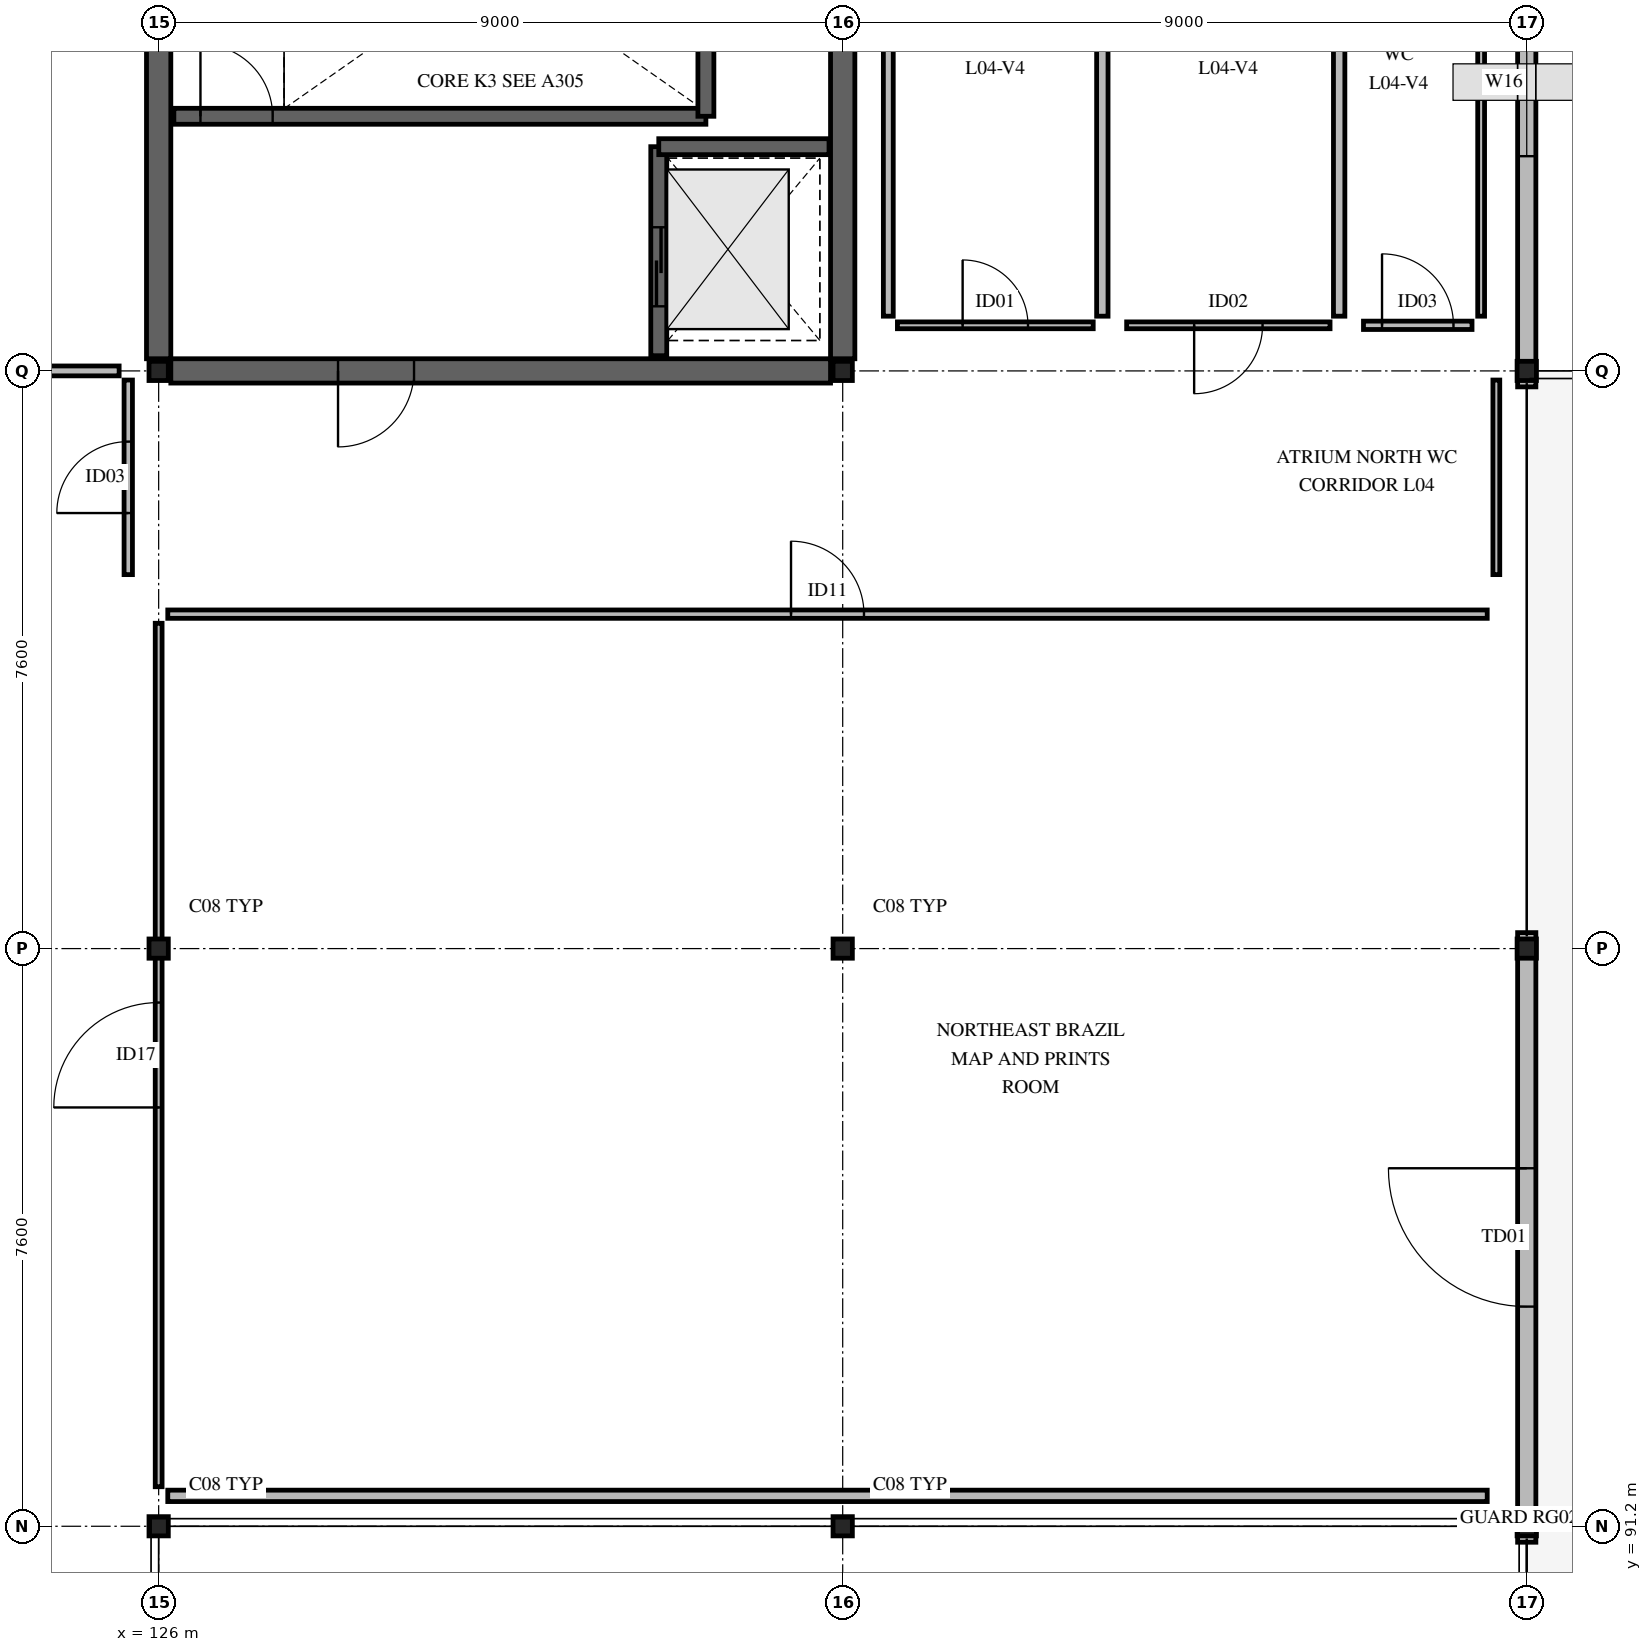
"""IFC4 building model, lengths in metres.
Left out: names, types, materials, properties, quantities, classifications, styles, units other than length and angle.
Written with IfcOpenShell. Run it as: python <this file> out.ifc"""

import sys

from ifc_helpers import new_model, si_unit, direction, frame, frame_2d, origin, origin_2d, place, context, subcontext, project, spatial, rectangle, i_section, extrude, element, fill, save


model = new_model("IFC4")
c1 = context("Model", 3, precision=1e-05, world=origin(), true_north=direction((0.0, 1.0)))
c2 = subcontext(c1, "Body", "Model", "MODEL_VIEW")
j1 = project(units=[si_unit("LENGTHUNIT", "METRE"), si_unit("PLANEANGLEUNIT", "RADIAN")], contexts=[c1])
p1 = place(None, origin())
s1 = spatial("IfcSite", under=j1, at=p1, CompositionType="ELEMENT")
p2 = place(p1, origin())
s2 = spatial("IfcBuilding", under=s1, at=p2, CompositionType="ELEMENT")
p3 = place(p2, frame((0.0, 0.0, 18.0)))
s3 = spatial("IfcBuildingStorey", under=s2, at=p3, CompositionType="ELEMENT", Elevation=18.0)
for number, where, z_axis, x_axis in (
    (1, (126.0, 91.2, 0.0), (0.0, 0.0, 1.0), (1.0, 0.0, 0.0)),
    (2, (126.0, 98.8, 0.0), (0.0, 0.0, 1.0), (1.0, 0.0, 0.0)),
    (3, (126.0, 106.4, 0.0), (0.0, 0.0, 1.0), (1.0, 0.0, 0.0)),
    (4, (135.0, 91.2, 0.0), (0.0, 0.0, 1.0), (1.0, 0.0, 0.0)),
    (5, (135.0, 98.8, 0.0), (0.0, 0.0, 1.0), (1.0, 0.0, 0.0)),
    (6, (135.0, 106.4, 0.0), (0.0, 0.0, 1.0), (1.0, 0.0, 0.0)),
    (7, (144.0, 91.2, 0.0), (0.0, 0.0, 1.0), (1.0, 0.0, 0.0)),
    (8, (144.0, 98.8, 0.0), (0.0, 0.0, 1.0), (1.0, 0.0, 0.0)),
    (9, (144.0, 106.4, 0.0), (0.0, 0.0, 1.0), (1.0, 0.0, 0.0)),
):
    element("IfcColumn", number, at=place(p3, frame(where, z_axis=z_axis, x_axis=x_axis)), inside=s3, PredefinedType="COLUMN", context=c2, shape_type="SweptSolid", body=[
        extrude(i_section(OverallWidth=0.254, OverallDepth=0.253, WebThickness=0.009, FlangeThickness=0.014, FilletRadius=0.012, at=origin_2d()), origin(), (0.0, 0.0, 1.0), 4.32),
    ])
p4 = place(p3, frame((144.0, 90.99, 0.0), z_axis=(0.0, 0.0, 1.0), x_axis=(0.0, 1.0, 0.0)))
e10 = element("IfcWall", 10, at=p4, inside=s3, PredefinedType="STANDARD", context=c2, shape_type="SweptSolid", body=[
    extrude(rectangle(XDim=8.02, YDim=0.24, at=frame_2d((4.01, 0.0))), origin(), (0.0, 0.0, 1.0), 3.768),
])
p5 = place(p4, frame((3.1, 0.0, 0.0)))
e11 = element("IfcOpeningElement", 11, at=p5, cuts=e10, PredefinedType="OPENING", context=c2, shape_type="SweptSolid", body=[
    extrude(rectangle(XDim=1.82, YDim=2.2, at=frame_2d((0.91, 1.1))), frame((0.0, 0.13, 0.0), z_axis=(0.0, -1.0, 0.0), x_axis=(1.0, 0.0, 0.0)), (0.0, 0.0, 1.0), 0.26),
])
p6 = place(p3, frame((144.0, 106.19, 0.0), z_axis=(0.0, 0.0, 1.0), x_axis=(0.0, 1.0, 0.0)))
e12 = element("IfcWall", 12, at=p6, inside=s3, PredefinedType="STANDARD", context=c2, shape_type="SweptSolid", body=[
    extrude(rectangle(XDim=7.81, YDim=0.24, at=frame_2d((3.905, 0.0))), origin(), (0.0, 0.0, 1.0), 3.768),
])
p7 = place(p6, frame((3.035, 0.0, 0.85)))
e13 = element("IfcOpeningElement", 13, at=p7, cuts=e12, PredefinedType="OPENING", context=c2, shape_type="SweptSolid", body=[
    extrude(rectangle(XDim=1.95, YDim=1.35, at=frame_2d((0.975, 0.675))), frame((0.0, 0.13, 0.0), z_axis=(0.0, -1.0, 0.0), x_axis=(1.0, 0.0, 0.0)), (0.0, 0.0, 1.0), 0.26),
])
p8 = place(p3, frame((126.16, 106.4, 0.0), z_axis=(0.0, 0.0, 1.0), x_axis=(1.0, 0.0, 0.0)))
e14 = element("IfcWall", 14, at=p8, inside=s3, PredefinedType="SHEAR", context=c2, shape_type="SweptSolid", body=[
    extrude(rectangle(XDim=8.68, YDim=0.32, at=frame_2d((4.34, 0.0))), origin(), (0.0, 0.0, 1.0), 4.04),
])
p9 = place(p8, frame((2.2, 0.0, 0.0)))
e15 = element("IfcOpeningElement", 15, at=p9, cuts=e14, PredefinedType="OPENING", context=c2, shape_type="SweptSolid", body=[
    extrude(rectangle(XDim=1.0, YDim=2.15, at=frame_2d((0.5, 1.075))), frame((0.0, 0.17, 0.0), z_axis=(0.0, -1.0, 0.0), x_axis=(1.0, 0.0, 0.0)), (0.0, 0.0, 1.0), 0.34),
])
for number, where, z_axis, x_axis in (
    (16, (126.0, 106.56, 0.0), (0.0, 0.0, 1.0), (0.0, 1.0, 0.0)),
    (17, (135.0, 106.56, 0.0), (0.0, 0.0, 1.0), (0.0, 1.0, 0.0)),
):
    element("IfcWall", number, at=place(p3, frame(where, z_axis=z_axis, x_axis=x_axis)), inside=s3, PredefinedType="SHEAR", context=c2, shape_type="SweptSolid", body=[
        extrude(rectangle(XDim=7.28, YDim=0.32, at=frame_2d((3.64, 0.0))), origin(), (0.0, 0.0, 1.0), 4.04),
    ])
p10 = place(p3, frame((126.2, 109.75, 0.0), z_axis=(0.0, 0.0, 1.0), x_axis=(1.0, 0.0, 0.0)))
e18 = element("IfcWall", 18, at=p10, inside=s3, PredefinedType="SOLIDWALL", context=c2, shape_type="SweptSolid", body=[
    extrude(rectangle(XDim=7.0, YDim=0.21, at=frame_2d((3.5, 0.0))), origin(), (0.0, 0.0, 1.0), 4.04),
])
p11 = place(p10, frame((0.35, 0.0, 0.0)))
e19 = element("IfcOpeningElement", 19, at=p11, cuts=e18, PredefinedType="OPENING", context=c2, shape_type="SweptSolid", body=[
    extrude(rectangle(XDim=0.95, YDim=2.12, at=frame_2d((0.475, 1.06))), frame((0.0, 0.115, 0.0), z_axis=(0.0, -1.0, 0.0), x_axis=(1.0, 0.0, 0.0)), (0.0, 0.0, 1.0), 0.23),
])
p12 = place(p3, frame((133.2, 109.75, 0.0), z_axis=(0.0, 0.0, 1.0), x_axis=(0.0, 1.0, 0.0)))
e20 = element("IfcWall", 20, at=p12, inside=s3, PredefinedType="SOLIDWALL", context=c2, shape_type="SweptSolid", body=[
    extrude(rectangle(XDim=4.05, YDim=0.21, at=frame_2d((2.025, 0.0))), origin(), (0.0, 0.0, 1.0), 4.04),
])
p13 = place(p3, frame((132.58, 106.6, 0.0), z_axis=(0.0, 0.0, 1.0), x_axis=(0.0, 1.0, 0.0)))
e21 = element("IfcWall", 21, at=p13, inside=s3, PredefinedType="SOLIDWALL", context=c2, shape_type="SweptSolid", body=[
    extrude(rectangle(XDim=2.75, YDim=0.21, at=frame_2d((1.375, 0.0))), origin(), (0.0, 0.0, 1.0), 4.04),
])
p14 = place(p13, frame((0.65, 0.0, 0.0)))
e22 = element("IfcOpeningElement", 22, at=p14, cuts=e21, PredefinedType="OPENING", context=c2, shape_type="SweptSolid", body=[
    extrude(rectangle(XDim=1.04, YDim=2.1, at=frame_2d((0.52, 1.05))), frame((0.0, 0.115, 0.0), z_axis=(0.0, -1.0, 0.0), x_axis=(1.0, 0.0, 0.0)), (0.0, 0.0, 1.0), 0.23),
])
p15 = place(p3, frame((132.58, 109.35, 0.0), z_axis=(0.0, 0.0, 1.0), x_axis=(1.0, 0.0, 0.0)))
e23 = element("IfcWall", 23, at=p15, inside=s3, PredefinedType="SOLIDWALL", context=c2, shape_type="SweptSolid", body=[
    extrude(rectangle(XDim=2.24, YDim=0.21, at=frame_2d((1.12, 0.0))), origin(), (0.0, 0.0, 1.0), 4.04),
])
p16 = place(p3, frame((126.12, 103.2, 0.0), z_axis=(0.0, 0.0, 1.0), x_axis=(1.0, 0.0, 0.0)))
e24 = element("IfcWall", 24, at=p16, inside=s3, PredefinedType="PARTITIONING", context=c2, shape_type="SweptSolid", body=[
    extrude(rectangle(XDim=17.36, YDim=0.11, at=frame_2d((8.68, 0.0))), origin(), (0.0, 0.0, 1.0), 4.04),
])
p17 = place(p16, frame((8.2, 0.0, 0.0)))
e25 = element("IfcOpeningElement", 25, at=p17, cuts=e24, PredefinedType="OPENING", context=c2, shape_type="SweptSolid", body=[
    extrude(rectangle(XDim=0.96, YDim=2.1, at=frame_2d((0.48, 1.05))), frame((0.0, 0.065, 0.0), z_axis=(0.0, -1.0, 0.0), x_axis=(1.0, 0.0, 0.0)), (0.0, 0.0, 1.0), 0.13),
])
p18 = place(p3, frame((126.0, 91.72, 0.0), z_axis=(0.0, 0.0, 1.0), x_axis=(0.0, 1.0, 0.0)))
e26 = element("IfcWall", 26, at=p18, inside=s3, PredefinedType="PARTITIONING", context=c2, shape_type="SweptSolid", body=[
    extrude(rectangle(XDim=11.36, YDim=0.09, at=frame_2d((5.68, 0.0))), origin(), (0.0, 0.0, 1.0), 3.611),
])
p19 = place(p18, frame((4.99, 0.0, 0.0)))
e27 = element("IfcOpeningElement", 27, at=p19, cuts=e26, PredefinedType="OPENING", context=c2, shape_type="SweptSolid", body=[
    extrude(rectangle(XDim=1.38, YDim=2.1, at=frame_2d((0.69, 1.05))), frame((0.0, 0.055, 0.0), z_axis=(0.0, -1.0, 0.0), x_axis=(1.0, 0.0, 0.0)), (0.0, 0.0, 1.0), 0.11),
])
p20 = place(p3, frame((126.12, 91.6, 0.0), z_axis=(0.0, 0.0, 1.0), x_axis=(1.0, 0.0, 0.0)))
e28 = element("IfcWall", 28, at=p20, inside=s3, PredefinedType="PARTITIONING", context=c2, shape_type="SweptSolid", body=[
    extrude(rectangle(XDim=17.36, YDim=0.15, at=frame_2d((8.68, 0.0))), origin(), (0.0, 0.0, 1.0), 4.04),
])
p21 = place(p3, frame((117.52, 106.4, 0.0), z_axis=(0.0, 0.0, 1.0), x_axis=(1.0, 0.0, 0.0)))
e29 = element("IfcWall", 29, at=p21, inside=s3, PredefinedType="PARTITIONING", context=c2, shape_type="SweptSolid", body=[
    extrude(rectangle(XDim=7.96, YDim=0.13, at=frame_2d((3.98, 0.0))), origin(), (0.0, 0.0, 1.0), 3.535),
])
p22 = place(p21, frame((3.47, 0.0, 0.0)))
e30 = element("IfcOpeningElement", 30, at=p22, cuts=e29, PredefinedType="OPENING", context=c2, shape_type="SweptSolid", body=[
    extrude(rectangle(XDim=1.02, YDim=2.1, at=frame_2d((0.51, 1.05))), frame((0.0, 0.075, 0.0), z_axis=(0.0, -1.0, 0.0), x_axis=(1.0, 0.0, 0.0)), (0.0, 0.0, 1.0), 0.15),
])
p23 = place(p3, frame((135.72, 107.0, 0.0), z_axis=(0.0, 0.0, 1.0), x_axis=(1.0, 0.0, 0.0)))
e31 = element("IfcWall", 31, at=p23, inside=s3, PredefinedType="PARTITIONING", context=c2, shape_type="SweptSolid", body=[
    extrude(rectangle(XDim=2.576, YDim=0.09, at=frame_2d((1.288, 0.0))), origin(), (0.0, 0.0, 1.0), 4.04),
])
p24 = place(p23, frame((0.858, 0.0, 0.0)))
e32 = element("IfcOpeningElement", 32, at=p24, cuts=e31, PredefinedType="OPENING", context=c2, shape_type="SweptSolid", body=[
    extrude(rectangle(XDim=0.86, YDim=2.06, at=frame_2d((0.43, 1.03))), frame((0.0, 0.055, 0.0), z_axis=(0.0, -1.0, 0.0), x_axis=(1.0, 0.0, 0.0)), (0.0, 0.0, 1.0), 0.11),
])
p25 = place(p3, frame((138.416, 107.12, 0.0), z_axis=(0.0, 0.0, 1.0), x_axis=(0.0, 1.0, 0.0)))
e33 = element("IfcWall", 33, at=p25, inside=s3, PredefinedType="PARTITIONING", context=c2, shape_type="SweptSolid", body=[
    extrude(rectangle(XDim=6.16, YDim=0.15, at=frame_2d((3.08, 0.0))), origin(), (0.0, 0.0, 1.0), 4.04),
])
p26 = place(p3, frame((135.6, 107.12, 0.0), z_axis=(0.0, 0.0, 1.0), x_axis=(0.0, 1.0, 0.0)))
e34 = element("IfcWall", 34, at=p26, inside=s3, PredefinedType="PARTITIONING", context=c2, shape_type="SweptSolid", body=[
    extrude(rectangle(XDim=6.16, YDim=0.13, at=frame_2d((3.08, 0.0))), origin(), (0.0, 0.0, 1.0), 4.04),
])
p27 = place(p3, frame((138.736, 107.0, 0.0), z_axis=(0.0, 0.0, 1.0), x_axis=(1.0, 0.0, 0.0)))
e35 = element("IfcWall", 35, at=p27, inside=s3, PredefinedType="PARTITIONING", context=c2, shape_type="SweptSolid", body=[
    extrude(rectangle(XDim=2.676, YDim=0.09, at=frame_2d((1.338, 0.0))), origin(), (0.0, 0.0, 1.0), 4.04),
])
p28 = place(p27, frame((0.888, 0.0, 0.0)))
e36 = element("IfcOpeningElement", 36, at=p28, cuts=e35, PredefinedType="OPENING", context=c2, shape_type="SweptSolid", body=[
    extrude(rectangle(XDim=0.9, YDim=2.06, at=frame_2d((0.45, 1.03))), frame((0.0, 0.055, 0.0), z_axis=(0.0, -1.0, 0.0), x_axis=(1.0, 0.0, 0.0)), (0.0, 0.0, 1.0), 0.11),
])
p29 = place(p3, frame((141.532, 107.12, 0.0), z_axis=(0.0, 0.0, 1.0), x_axis=(0.0, 1.0, 0.0)))
e37 = element("IfcWall", 37, at=p29, inside=s3, PredefinedType="PARTITIONING", context=c2, shape_type="SweptSolid", body=[
    extrude(rectangle(XDim=6.16, YDim=0.15, at=frame_2d((3.08, 0.0))), origin(), (0.0, 0.0, 1.0), 4.04),
])
p30 = place(p3, frame((141.852, 107.0, 0.0), z_axis=(0.0, 0.0, 1.0), x_axis=(1.0, 0.0, 0.0)))
e38 = element("IfcWall", 38, at=p30, inside=s3, PredefinedType="PARTITIONING", context=c2, shape_type="SweptSolid", body=[
    extrude(rectangle(XDim=1.428, YDim=0.11, at=frame_2d((0.714, 0.0))), origin(), (0.0, 0.0, 1.0), 4.04),
])
p31 = place(p30, frame((0.244, 0.0, 0.0)))
e39 = element("IfcOpeningElement", 39, at=p31, cuts=e38, PredefinedType="OPENING", context=c2, shape_type="SweptSolid", body=[
    extrude(rectangle(XDim=0.94, YDim=2.06, at=frame_2d((0.47, 1.03))), frame((0.0, 0.065, 0.0), z_axis=(0.0, -1.0, 0.0), x_axis=(1.0, 0.0, 0.0)), (0.0, 0.0, 1.0), 0.13),
])
p32 = place(p3, frame((143.4, 107.12, 0.0), z_axis=(0.0, 0.0, 1.0), x_axis=(0.0, 1.0, 0.0)))
e40 = element("IfcWall", 40, at=p32, inside=s3, PredefinedType="PARTITIONING", context=c2, shape_type="SweptSolid", body=[
    extrude(rectangle(XDim=6.16, YDim=0.09, at=frame_2d((3.08, 0.0))), origin(), (0.0, 0.0, 1.0), 4.04),
])
p33 = place(p3, frame((125.6, 103.72, 0.0), z_axis=(0.0, 0.0, 1.0), x_axis=(0.0, 1.0, 0.0)))
e41 = element("IfcWall", 41, at=p33, inside=s3, PredefinedType="PARTITIONING", context=c2, shape_type="SweptSolid", body=[
    extrude(rectangle(XDim=2.56, YDim=0.11, at=frame_2d((1.28, 0.0))), origin(), (0.0, 0.0, 1.0), 4.04),
])
p34 = place(p33, frame((0.81, 0.0, 0.0)))
e42 = element("IfcOpeningElement", 42, at=p34, cuts=e41, PredefinedType="OPENING", context=c2, shape_type="SweptSolid", body=[
    extrude(rectangle(XDim=0.94, YDim=2.06, at=frame_2d((0.47, 1.03))), frame((0.0, 0.065, 0.0), z_axis=(0.0, -1.0, 0.0), x_axis=(1.0, 0.0, 0.0)), (0.0, 0.0, 1.0), 0.13),
])
p35 = place(p3, frame((143.6, 103.72, 0.0), z_axis=(0.0, 0.0, 1.0), x_axis=(0.0, 1.0, 0.0)))
e43 = element("IfcWall", 43, at=p35, inside=s3, PredefinedType="PARTITIONING", context=c2, shape_type="SweptSolid", body=[
    extrude(rectangle(XDim=2.56, YDim=0.09, at=frame_2d((1.28, 0.0))), origin(), (0.0, 0.0, 1.0), 4.04),
])
p36 = place(p5, frame((1.82, 0.0, 0.0), z_axis=(0.0, 0.0, 1.0), x_axis=(-1.0, 0.0, 0.0)))
e44 = element("IfcDoor", 44, at=p36, inside=s3, OperationType="SINGLE_SWING_LEFT", PredefinedType="DOOR", context=c2, shape_type="SweptSolid", body=[
    extrude(rectangle(XDim=1.82, YDim=2.2, at=frame_2d((0.91, 1.1))), frame((0.0, 0.025, 0.0), z_axis=(0.0, -1.0, 0.0), x_axis=(1.0, 0.0, 0.0)), (0.0, 0.0, 1.0), 0.05),
])
fill(e11, e44)
p37 = place(p7, origin())
e45 = element("IfcWindow", 45, at=p37, inside=s3, PartitioningType="SINGLE_PANEL", PredefinedType="WINDOW", context=c2, shape_type="SweptSolid", body=[
    extrude(rectangle(XDim=1.95, YDim=1.35, at=frame_2d((0.975, 0.675))), frame((0.0, 0.03, 0.0), z_axis=(0.0, -1.0, 0.0), x_axis=(1.0, 0.0, 0.0)), (0.0, 0.0, 1.0), 0.06),
])
fill(e13, e45)
p38 = place(p11, origin())
e46 = element("IfcDoor", 46, at=p38, inside=s3, OperationType="SINGLE_SWING_LEFT", PredefinedType="DOOR", context=c2, shape_type="SweptSolid", body=[
    extrude(rectangle(XDim=0.95, YDim=2.12, at=frame_2d((0.475, 1.06))), frame((0.0, 0.025, 0.0), z_axis=(0.0, -1.0, 0.0), x_axis=(1.0, 0.0, 0.0)), (0.0, 0.0, 1.0), 0.05),
])
fill(e19, e46)
p39 = place(p14, origin())
e47 = element("IfcDoor", 47, at=p39, inside=s3, OperationType="SLIDING_TO_LEFT", PredefinedType="DOOR", context=c2, shape_type="SweptSolid", body=[
    extrude(rectangle(XDim=1.04, YDim=2.1, at=frame_2d((0.52, 1.05))), frame((0.0, 0.025, 0.0), z_axis=(0.0, -1.0, 0.0), x_axis=(1.0, 0.0, 0.0)), (0.0, 0.0, 1.0), 0.05),
])
fill(e22, e47)
p40 = place(p9, origin())
e48 = element("IfcDoor", 48, at=p40, inside=s3, OperationType="SINGLE_SWING_RIGHT", PredefinedType="DOOR", context=c2, shape_type="SweptSolid", body=[
    extrude(rectangle(XDim=1.0, YDim=2.15, at=frame_2d((0.5, 1.075))), frame((0.0, 0.025, 0.0), z_axis=(0.0, -1.0, 0.0), x_axis=(1.0, 0.0, 0.0)), (0.0, 0.0, 1.0), 0.05),
])
fill(e15, e48)
p41 = place(p17, origin())
e49 = element("IfcDoor", 49, at=p41, inside=s3, OperationType="SINGLE_SWING_LEFT", PredefinedType="DOOR", context=c2, shape_type="SweptSolid", body=[
    extrude(rectangle(XDim=0.96, YDim=2.1, at=frame_2d((0.48, 1.05))), frame((0.0, 0.025, 0.0), z_axis=(0.0, -1.0, 0.0), x_axis=(1.0, 0.0, 0.0)), (0.0, 0.0, 1.0), 0.05),
])
fill(e25, e49)
p42 = place(p24, origin())
e50 = element("IfcDoor", 50, at=p42, inside=s3, OperationType="SINGLE_SWING_LEFT", PredefinedType="DOOR", context=c2, shape_type="SweptSolid", body=[
    extrude(rectangle(XDim=0.86, YDim=2.06, at=frame_2d((0.43, 1.03))), frame((0.0, 0.025, 0.0), z_axis=(0.0, -1.0, 0.0), x_axis=(1.0, 0.0, 0.0)), (0.0, 0.0, 1.0), 0.05),
])
fill(e32, e50)
p43 = place(p28, origin())
e51 = element("IfcDoor", 51, at=p43, inside=s3, OperationType="SINGLE_SWING_RIGHT", PredefinedType="DOOR", context=c2, shape_type="SweptSolid", body=[
    extrude(rectangle(XDim=0.9, YDim=2.06, at=frame_2d((0.45, 1.03))), frame((0.0, 0.025, 0.0), z_axis=(0.0, -1.0, 0.0), x_axis=(1.0, 0.0, 0.0)), (0.0, 0.0, 1.0), 0.05),
])
fill(e36, e51)
p44 = place(p31, origin())
e52 = element("IfcDoor", 52, at=p44, inside=s3, OperationType="SINGLE_SWING_LEFT", PredefinedType="DOOR", context=c2, shape_type="SweptSolid", body=[
    extrude(rectangle(XDim=0.94, YDim=2.06, at=frame_2d((0.47, 1.03))), frame((0.0, 0.025, 0.0), z_axis=(0.0, -1.0, 0.0), x_axis=(1.0, 0.0, 0.0)), (0.0, 0.0, 1.0), 0.05),
])
fill(e39, e52)
p45 = place(p19, origin())
e53 = element("IfcDoor", 53, at=p45, inside=s3, OperationType="SINGLE_SWING_LEFT", PredefinedType="DOOR", context=c2, shape_type="SweptSolid", body=[
    extrude(rectangle(XDim=1.38, YDim=2.1, at=frame_2d((0.69, 1.05))), frame((0.0, 0.025, 0.0), z_axis=(0.0, -1.0, 0.0), x_axis=(1.0, 0.0, 0.0)), (0.0, 0.0, 1.0), 0.05),
])
fill(e27, e53)
p46 = place(p34, origin())
e54 = element("IfcDoor", 54, at=p46, inside=s3, OperationType="SINGLE_SWING_LEFT", PredefinedType="DOOR", context=c2, shape_type="SweptSolid", body=[
    extrude(rectangle(XDim=0.94, YDim=2.06, at=frame_2d((0.47, 1.03))), frame((0.0, 0.025, 0.0), z_axis=(0.0, -1.0, 0.0), x_axis=(1.0, 0.0, 0.0)), (0.0, 0.0, 1.0), 0.05),
])
fill(e42, e54)
save(model, sys.argv[1])
